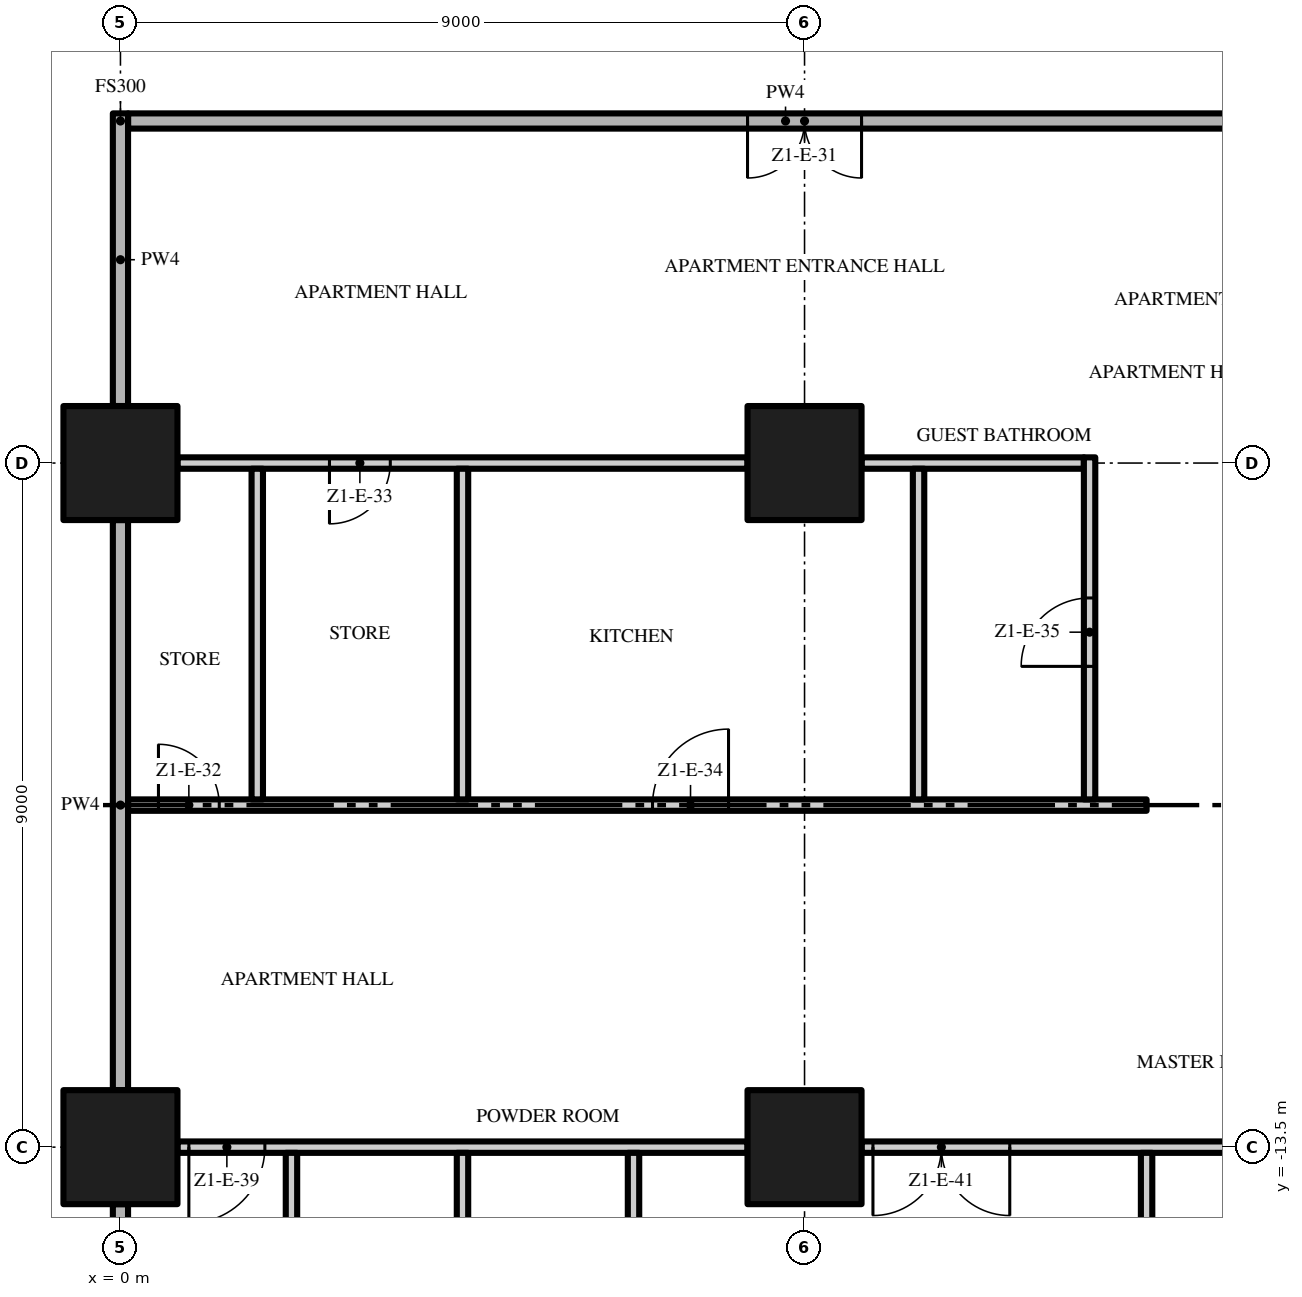
"""IFC4 building model, lengths in metres.
Left out: names, types, materials, properties, quantities, classifications, styles, units other than length and angle.
Written with IfcOpenShell. Run it as: python <this file> out.ifc"""

import sys

from ifc_helpers import new_model, si_unit, direction, frame, frame_2d, origin, origin_2d, place, context, subcontext, project, spatial, rectangle, extrude, element, fill, save


model = new_model("IFC4")
c1 = context("Model", 3, precision=1e-05, world=origin(), true_north=direction((0.0, 1.0)))
c2 = subcontext(c1, "Body", "Model", "MODEL_VIEW")
j1 = project(units=[si_unit("LENGTHUNIT", "METRE"), si_unit("PLANEANGLEUNIT", "RADIAN")], contexts=[c1])
p1 = place(None, origin())
s1 = spatial("IfcSite", under=j1, at=p1, CompositionType="ELEMENT")
p2 = place(p1, origin())
s2 = spatial("IfcBuilding", under=s1, at=p2, CompositionType="ELEMENT")
p3 = place(p2, frame((0.0, 0.0, 56.8)))
s3 = spatial("IfcBuildingStorey", under=s2, at=p3, CompositionType="ELEMENT", Elevation=56.8)
for number, where, z_axis, x_axis in (
    (1, (0.0, -13.5, 0.0), (0.0, 0.0, 1.0), (1.0, 0.0, 0.0)),
    (2, (0.0, -4.5, 0.0), (0.0, 0.0, 1.0), (1.0, 0.0, 0.0)),
    (3, (9.0, -13.5, 0.0), (0.0, 0.0, 1.0), (1.0, 0.0, 0.0)),
    (4, (9.0, -4.5, 0.0), (0.0, 0.0, 1.0), (1.0, 0.0, 0.0)),
):
    element("IfcColumn", number, at=place(p3, frame(where, z_axis=z_axis, x_axis=x_axis)), inside=s3, PredefinedType="COLUMN", context=c2, shape_type="SweptSolid", body=[
        extrude(rectangle(XDim=1.5, YDim=1.5, at=origin_2d()), origin(), (0.0, 0.0, 1.0), 3.5),
    ])
p4 = place(p3, frame((8.25, -13.5, 0.0), z_axis=(0.0, 0.0, 1.0), x_axis=(-1.0, 0.0, 0.0)))
e5 = element("IfcWall", 5, at=p4, inside=s3, PredefinedType="PARTITIONING", context=c2, shape_type="SweptSolid", body=[
    extrude(rectangle(XDim=7.5, YDim=0.15, at=frame_2d((3.75, 0.0))), origin(), (0.0, 0.0, 1.0), 3.5),
])
p5 = place(p4, frame((6.35, 0.0, 0.0)))
e6 = element("IfcOpeningElement", 6, at=p5, cuts=e5, PredefinedType="OPENING", context=c2, shape_type="SweptSolid", body=[
    extrude(rectangle(XDim=1.0, YDim=2.4, at=frame_2d((0.5, 1.2))), frame((0.0, 0.085, 0.0), z_axis=(0.0, -1.0, 0.0), x_axis=(1.0, 0.0, 0.0)), (0.0, 0.0, 1.0), 0.17),
])
p6 = place(p3, frame((17.25, -13.5, 0.0), z_axis=(0.0, 0.0, 1.0), x_axis=(-1.0, 0.0, 0.0)))
e7 = element("IfcWall", 7, at=p6, inside=s3, PredefinedType="PARTITIONING", context=c2, shape_type="SweptSolid", body=[
    extrude(rectangle(XDim=7.5, YDim=0.15, at=frame_2d((3.75, 0.0))), origin(), (0.0, 0.0, 1.0), 3.5),
])
p7 = place(p6, frame((5.55, 0.0, 0.0)))
e8 = element("IfcOpeningElement", 8, at=p7, cuts=e7, PredefinedType="OPENING", context=c2, shape_type="SweptSolid", body=[
    extrude(rectangle(XDim=1.8, YDim=2.4, at=frame_2d((0.9, 1.2))), frame((0.0, 0.085, 0.0), z_axis=(0.0, -1.0, 0.0), x_axis=(1.0, 0.0, 0.0)), (0.0, 0.0, 1.0), 0.17),
])
p8 = place(p6, frame((0.15, 0.0, 0.0)))
e9 = element("IfcOpeningElement", 9, at=p8, cuts=e7, PredefinedType="OPENING", context=c2, shape_type="SweptSolid", body=[
    extrude(rectangle(XDim=1.0, YDim=2.4, at=frame_2d((0.5, 1.2))), frame((0.0, 0.085, 0.0), z_axis=(0.0, -1.0, 0.0), x_axis=(1.0, 0.0, 0.0)), (0.0, 0.0, 1.0), 0.17),
])
p9 = place(p3, frame((0.1, -9.0, 0.0), z_axis=(0.0, 0.0, 1.0), x_axis=(1.0, 0.0, 0.0)))
e10 = element("IfcWall", 10, at=p9, inside=s3, PredefinedType="PARTITIONING", context=c2, shape_type="SweptSolid", body=[
    extrude(rectangle(XDim=13.4, YDim=0.15, at=frame_2d((6.7, 0.0))), origin(), (0.0, 0.0, 1.0), 3.5),
])
p10 = place(p9, frame((0.4, 0.0, 0.0)))
e11 = element("IfcOpeningElement", 11, at=p10, cuts=e10, PredefinedType="OPENING", context=c2, shape_type="SweptSolid", body=[
    extrude(rectangle(XDim=0.8, YDim=2.0, at=frame_2d((0.4, 1.0))), frame((0.0, 0.085, 0.0), z_axis=(0.0, -1.0, 0.0), x_axis=(1.0, 0.0, 0.0)), (0.0, 0.0, 1.0), 0.17),
])
p11 = place(p9, frame((6.9, 0.0, 0.0)))
e12 = element("IfcOpeningElement", 12, at=p11, cuts=e10, PredefinedType="OPENING", context=c2, shape_type="SweptSolid", body=[
    extrude(rectangle(XDim=1.0, YDim=2.4, at=frame_2d((0.5, 1.2))), frame((0.0, 0.085, 0.0), z_axis=(0.0, -1.0, 0.0), x_axis=(1.0, 0.0, 0.0)), (0.0, 0.0, 1.0), 0.17),
])
p12 = place(p3, frame((8.25, -4.5, 0.0), z_axis=(0.0, 0.0, 1.0), x_axis=(-1.0, 0.0, 0.0)))
e13 = element("IfcWall", 13, at=p12, inside=s3, PredefinedType="PARTITIONING", context=c2, shape_type="SweptSolid", body=[
    extrude(rectangle(XDim=7.5, YDim=0.15, at=frame_2d((3.75, 0.0))), origin(), (0.0, 0.0, 1.0), 3.5),
])
p13 = place(p12, frame((4.7, 0.0, 0.0)))
e14 = element("IfcOpeningElement", 14, at=p13, cuts=e13, PredefinedType="OPENING", context=c2, shape_type="SweptSolid", body=[
    extrude(rectangle(XDim=0.8, YDim=2.0, at=frame_2d((0.4, 1.0))), frame((0.0, 0.085, 0.0), z_axis=(0.0, -1.0, 0.0), x_axis=(1.0, 0.0, 0.0)), (0.0, 0.0, 1.0), 0.17),
])
p14 = place(p3, frame((9.75, -4.5, 0.0), z_axis=(0.0, 0.0, 1.0), x_axis=(1.0, 0.0, 0.0)))
e15 = element("IfcWall", 15, at=p14, inside=s3, PredefinedType="PARTITIONING", context=c2, shape_type="SweptSolid", body=[
    extrude(rectangle(XDim=2.925, YDim=0.15, at=frame_2d((1.462, 0.0))), origin(), (0.0, 0.0, 1.0), 3.5),
])
p15 = place(p3, frame((17.4, 0.0, 0.0), z_axis=(0.0, 0.0, 1.0), x_axis=(-1.0, 0.0, 0.0)))
e16 = element("IfcWall", 16, at=p15, inside=s3, PredefinedType="PARTITIONING", context=c2, shape_type="SweptSolid", body=[
    extrude(rectangle(XDim=17.3, YDim=0.2, at=frame_2d((8.65, 0.0))), origin(), (0.0, 0.0, 1.0), 3.5),
])
p16 = place(p15, frame((7.65, 0.0, 0.0)))
e17 = element("IfcOpeningElement", 17, at=p16, cuts=e16, PredefinedType="OPENING", context=c2, shape_type="SweptSolid", body=[
    extrude(rectangle(XDim=1.5, YDim=2.4, at=frame_2d((0.75, 1.2))), frame((0.0, 0.11, 0.0), z_axis=(0.0, -1.0, 0.0), x_axis=(1.0, 0.0, 0.0)), (0.0, 0.0, 1.0), 0.22),
])
p17 = place(p3, frame((0.0, -21.1, 0.0), z_axis=(0.0, 0.0, 1.0), x_axis=(0.0, 1.0, 0.0)))
e18 = element("IfcWall", 18, at=p17, inside=s3, PredefinedType="PARTITIONING", context=c2, shape_type="SweptSolid", body=[
    extrude(rectangle(XDim=6.85, YDim=0.2, at=frame_2d((3.425, 0.0))), origin(), (0.0, 0.0, 1.0), 3.5),
])
p18 = place(p3, frame((0.0, -12.75, 0.0), z_axis=(0.0, 0.0, 1.0), x_axis=(0.0, 1.0, 0.0)))
e19 = element("IfcWall", 19, at=p18, inside=s3, PredefinedType="PARTITIONING", context=c2, shape_type="SweptSolid", body=[
    extrude(rectangle(XDim=7.5, YDim=0.2, at=frame_2d((3.75, 0.0))), origin(), (0.0, 0.0, 1.0), 3.5),
])
p19 = place(p3, frame((0.0, -3.75, 0.0), z_axis=(0.0, 0.0, 1.0), x_axis=(0.0, 1.0, 0.0)))
e20 = element("IfcWall", 20, at=p19, inside=s3, PredefinedType="PARTITIONING", context=c2, shape_type="SweptSolid", body=[
    extrude(rectangle(XDim=3.85, YDim=0.2, at=frame_2d((1.925, 0.0))), origin(), (0.0, 0.0, 1.0), 3.5),
])
p20 = place(p3, frame((1.8, -8.925, 0.0), z_axis=(0.0, 0.0, 1.0), x_axis=(0.0, 1.0, 0.0)))
e21 = element("IfcWall", 21, at=p20, inside=s3, PredefinedType="PARTITIONING", context=c2, shape_type="SweptSolid", body=[
    extrude(rectangle(XDim=4.35, YDim=0.15, at=frame_2d((2.175, 0.0))), origin(), (0.0, 0.0, 1.0), 3.5),
])
p21 = place(p3, frame((2.25, -16.575, 0.0), z_axis=(0.0, 0.0, 1.0), x_axis=(0.0, 1.0, 0.0)))
e22 = element("IfcWall", 22, at=p21, inside=s3, PredefinedType="PARTITIONING", context=c2, shape_type="SweptSolid", body=[
    extrude(rectangle(XDim=3.0, YDim=0.15, at=frame_2d((1.5, 0.0))), origin(), (0.0, 0.0, 1.0), 3.5),
])
p22 = place(p3, frame((4.5, -22.2, 0.0), z_axis=(0.0, 0.0, 1.0), x_axis=(0.0, 1.0, 0.0)))
e23 = element("IfcWall", 23, at=p22, inside=s3, PredefinedType="PARTITIONING", context=c2, shape_type="SweptSolid", body=[
    extrude(rectangle(XDim=8.625, YDim=0.15, at=frame_2d((4.312, 0.0))), origin(), (0.0, 0.0, 1.0), 3.5),
])
p23 = place(p3, frame((4.5, -8.925, 0.0), z_axis=(0.0, 0.0, 1.0), x_axis=(0.0, 1.0, 0.0)))
e24 = element("IfcWall", 24, at=p23, inside=s3, PredefinedType="PARTITIONING", context=c2, shape_type="SweptSolid", body=[
    extrude(rectangle(XDim=4.35, YDim=0.15, at=frame_2d((2.175, 0.0))), origin(), (0.0, 0.0, 1.0), 3.5),
])
p24 = place(p3, frame((6.75, -16.575, 0.0), z_axis=(0.0, 0.0, 1.0), x_axis=(0.0, 1.0, 0.0)))
e25 = element("IfcWall", 25, at=p24, inside=s3, PredefinedType="PARTITIONING", context=c2, shape_type="SweptSolid", body=[
    extrude(rectangle(XDim=3.0, YDim=0.15, at=frame_2d((1.5, 0.0))), origin(), (0.0, 0.0, 1.0), 3.5),
])
p25 = place(p3, frame((10.5, -8.925, 0.0), z_axis=(0.0, 0.0, 1.0), x_axis=(0.0, 1.0, 0.0)))
e26 = element("IfcWall", 26, at=p25, inside=s3, PredefinedType="PARTITIONING", context=c2, shape_type="SweptSolid", body=[
    extrude(rectangle(XDim=4.35, YDim=0.15, at=frame_2d((2.175, 0.0))), origin(), (0.0, 0.0, 1.0), 3.5),
])
p26 = place(p3, frame((12.75, -8.925, 0.0), z_axis=(0.0, 0.0, 1.0), x_axis=(0.0, 1.0, 0.0)))
e27 = element("IfcWall", 27, at=p26, inside=s3, PredefinedType="PARTITIONING", context=c2, shape_type="SweptSolid", body=[
    extrude(rectangle(XDim=4.5, YDim=0.15, at=frame_2d((2.25, 0.0))), origin(), (0.0, 0.0, 1.0), 3.5),
])
p27 = place(p26, frame((1.75, 0.0, 0.0)))
e28 = element("IfcOpeningElement", 28, at=p27, cuts=e27, PredefinedType="OPENING", context=c2, shape_type="SweptSolid", body=[
    extrude(rectangle(XDim=0.9, YDim=2.1, at=frame_2d((0.45, 1.05))), frame((0.0, 0.085, 0.0), z_axis=(0.0, -1.0, 0.0), x_axis=(1.0, 0.0, 0.0)), (0.0, 0.0, 1.0), 0.17),
])
p28 = place(p3, frame((13.5, -22.2, 0.0), z_axis=(0.0, 0.0, 1.0), x_axis=(0.0, 1.0, 0.0)))
e29 = element("IfcWall", 29, at=p28, inside=s3, PredefinedType="PARTITIONING", context=c2, shape_type="SweptSolid", body=[
    extrude(rectangle(XDim=8.625, YDim=0.15, at=frame_2d((4.312, 0.0))), origin(), (0.0, 0.0, 1.0), 3.5),
])
p29 = place(p16, origin())
e30 = element("IfcDoor", 30, at=p29, inside=s3, OperationType="DOUBLE_DOOR_SINGLE_SWING", PredefinedType="DOOR", context=c2, shape_type="SweptSolid", body=[
    extrude(rectangle(XDim=1.5, YDim=2.4, at=frame_2d((0.75, 1.2))), frame((0.0, 0.025, 0.0), z_axis=(0.0, -1.0, 0.0), x_axis=(1.0, 0.0, 0.0)), (0.0, 0.0, 1.0), 0.05),
])
fill(e17, e30)
p30 = place(p10, origin())
e31 = element("IfcDoor", 31, at=p30, inside=s3, OperationType="SINGLE_SWING_LEFT", PredefinedType="DOOR", context=c2, shape_type="SweptSolid", body=[
    extrude(rectangle(XDim=0.8, YDim=2.0, at=frame_2d((0.4, 1.0))), frame((0.0, 0.025, 0.0), z_axis=(0.0, -1.0, 0.0), x_axis=(1.0, 0.0, 0.0)), (0.0, 0.0, 1.0), 0.05),
])
fill(e11, e31)
p31 = place(p13, origin())
e32 = element("IfcDoor", 32, at=p31, inside=s3, OperationType="SINGLE_SWING_RIGHT", PredefinedType="DOOR", context=c2, shape_type="SweptSolid", body=[
    extrude(rectangle(XDim=0.8, YDim=2.0, at=frame_2d((0.4, 1.0))), frame((0.0, 0.025, 0.0), z_axis=(0.0, -1.0, 0.0), x_axis=(1.0, 0.0, 0.0)), (0.0, 0.0, 1.0), 0.05),
])
fill(e14, e32)
p32 = place(p11, origin())
e33 = element("IfcDoor", 33, at=p32, inside=s3, OperationType="SINGLE_SWING_RIGHT", PredefinedType="DOOR", context=c2, shape_type="SweptSolid", body=[
    extrude(rectangle(XDim=1.0, YDim=2.4, at=frame_2d((0.5, 1.2))), frame((0.0, 0.025, 0.0), z_axis=(0.0, -1.0, 0.0), x_axis=(1.0, 0.0, 0.0)), (0.0, 0.0, 1.0), 0.05),
])
fill(e12, e33)
p33 = place(p27, origin())
e34 = element("IfcDoor", 34, at=p33, inside=s3, OperationType="SINGLE_SWING_LEFT", PredefinedType="DOOR", context=c2, shape_type="SweptSolid", body=[
    extrude(rectangle(XDim=0.9, YDim=2.1, at=frame_2d((0.45, 1.05))), frame((0.0, 0.025, 0.0), z_axis=(0.0, -1.0, 0.0), x_axis=(1.0, 0.0, 0.0)), (0.0, 0.0, 1.0), 0.05),
])
fill(e28, e34)
p34 = place(p5, origin())
e35 = element("IfcDoor", 35, at=p34, inside=s3, OperationType="SINGLE_SWING_RIGHT", PredefinedType="DOOR", context=c2, shape_type="SweptSolid", body=[
    extrude(rectangle(XDim=1.0, YDim=2.4, at=frame_2d((0.5, 1.2))), frame((0.0, 0.025, 0.0), z_axis=(0.0, -1.0, 0.0), x_axis=(1.0, 0.0, 0.0)), (0.0, 0.0, 1.0), 0.05),
])
fill(e6, e35)
p35 = place(p7, origin())
e36 = element("IfcDoor", 36, at=p35, inside=s3, OperationType="DOUBLE_DOOR_SINGLE_SWING", PredefinedType="DOOR", context=c2, shape_type="SweptSolid", body=[
    extrude(rectangle(XDim=1.8, YDim=2.4, at=frame_2d((0.9, 1.2))), frame((0.0, 0.025, 0.0), z_axis=(0.0, -1.0, 0.0), x_axis=(1.0, 0.0, 0.0)), (0.0, 0.0, 1.0), 0.05),
])
fill(e8, e36)
save(model, sys.argv[1])
